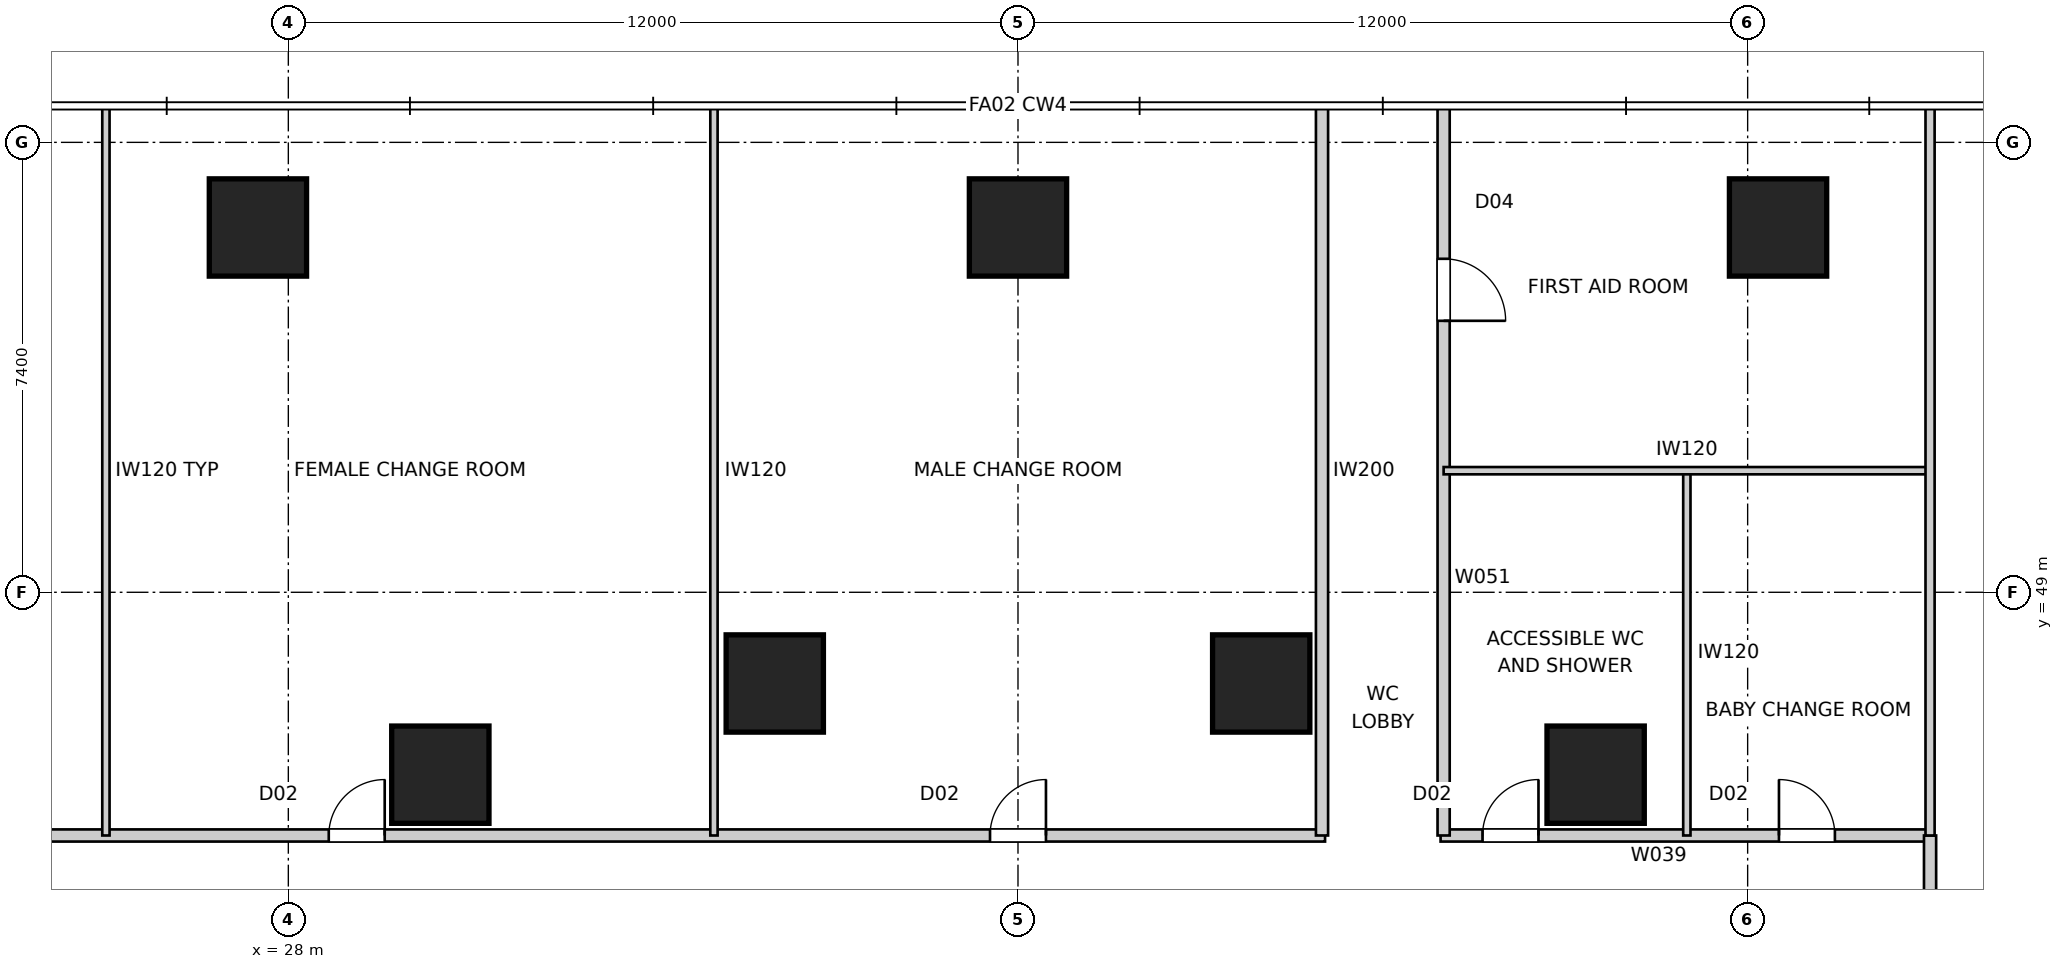
"""IFC4 building model, lengths in metres.
Left out: names, types, materials, properties, quantities, classifications, styles, units other than length and angle.
Written with IfcOpenShell. Run it as: python <this file> out.ifc"""

import sys

from ifc_helpers import new_model, si_unit, direction, frame, frame_2d, origin, origin_2d, place, context, subcontext, project, spatial, rectangle, extrude, element, fill, save


model = new_model("IFC4")
c1 = context("Model", 3, precision=1e-05, world=origin(), true_north=direction((0.0, 1.0)))
c2 = subcontext(c1, "Body", "Model", "MODEL_VIEW")
j1 = project(units=[si_unit("LENGTHUNIT", "METRE"), si_unit("PLANEANGLEUNIT", "RADIAN")], contexts=[c1])
p1 = place(None, origin())
s1 = spatial("IfcSite", under=j1, at=p1, CompositionType="ELEMENT")
p2 = place(p1, origin())
s2 = spatial("IfcBuilding", under=s1, at=p2, CompositionType="ELEMENT")
p3 = place(p2, frame((0.0, 0.0, 6.0)))
s3 = spatial("IfcBuildingStorey", under=s2, at=p3, CompositionType="ELEMENT", Elevation=6.0)
for number, where, z_axis, x_axis in (
    (1, (52.5, 55.0, 0.0), (0.0, 0.0, 1.0), (1.0, 0.0, 0.0)),
    (2, (40.0, 55.0, 0.0), (0.0, 0.0, 1.0), (1.0, 0.0, 0.0)),
    (3, (27.5, 55.0, 0.0), (0.0, 0.0, 1.0), (1.0, 0.0, 0.0)),
    (4, (49.5, 46.0, 0.0), (0.0, 0.0, 1.0), (1.0, 0.0, 0.0)),
    (5, (44.0, 47.5, 0.0), (0.0, 0.0, 1.0), (1.0, 0.0, 0.0)),
    (6, (36.0, 47.5, 0.0), (0.0, 0.0, 1.0), (1.0, 0.0, 0.0)),
    (7, (30.5, 46.0, 0.0), (0.0, 0.0, 1.0), (1.0, 0.0, 0.0)),
):
    element("IfcColumn", number, at=place(p3, frame(where, z_axis=z_axis, x_axis=x_axis)), inside=s3, PredefinedType="COLUMN", context=c2, shape_type="SweptSolid", body=[
        extrude(rectangle(XDim=1.6, YDim=1.6, at=origin_2d()), origin(), (0.0, 0.0, 1.0), 4.5),
    ])
p4 = place(p3, frame((8.4, 45.0, 0.0), z_axis=(0.0, 0.0, 1.0), x_axis=(1.0, 0.0, 0.0)))
e8 = element("IfcWall", 8, at=p4, inside=s3, PredefinedType="PARTITIONING", context=c2, shape_type="SweptSolid", body=[
    extrude(rectangle(XDim=36.65, YDim=0.2, at=frame_2d((18.325, 0.0))), origin(), (0.0, 0.0, 1.0), 4.15),
])
p5 = place(p4, frame((31.14, 0.0, 0.0)))
e9 = element("IfcOpeningElement", 9, at=p5, cuts=e8, PredefinedType="OPENING", context=c2, shape_type="SweptSolid", body=[
    extrude(rectangle(XDim=0.92, YDim=2.34, at=frame_2d((0.46, 1.17))), frame((0.0, 0.11, 0.0), z_axis=(0.0, -1.0, 0.0), x_axis=(1.0, 0.0, 0.0)), (0.0, 0.0, 1.0), 0.22),
])
p6 = place(p4, frame((20.265, 0.0, 0.0)))
e10 = element("IfcOpeningElement", 10, at=p6, cuts=e8, PredefinedType="OPENING", context=c2, shape_type="SweptSolid", body=[
    extrude(rectangle(XDim=0.92, YDim=2.34, at=frame_2d((0.46, 1.17))), frame((0.0, 0.11, 0.0), z_axis=(0.0, -1.0, 0.0), x_axis=(1.0, 0.0, 0.0)), (0.0, 0.0, 1.0), 0.22),
])
p7 = place(p4, frame((7.715, 0.0, 0.0)))
e11 = element("IfcOpeningElement", 11, at=p7, cuts=e8, PredefinedType="OPENING", context=c2, shape_type="SweptSolid", body=[
    extrude(rectangle(XDim=0.92, YDim=2.34, at=frame_2d((0.46, 1.17))), frame((0.0, 0.11, 0.0), z_axis=(0.0, -1.0, 0.0), x_axis=(1.0, 0.0, 0.0)), (0.0, 0.0, 1.0), 0.22),
])
p8 = place(p3, frame((46.95, 45.0, 0.0), z_axis=(0.0, 0.0, 1.0), x_axis=(1.0, 0.0, 0.0)))
e12 = element("IfcWall", 12, at=p8, inside=s3, PredefinedType="PARTITIONING", context=c2, shape_type="SweptSolid", body=[
    extrude(rectangle(XDim=8.05, YDim=0.2, at=frame_2d((4.025, 0.0))), origin(), (0.0, 0.0, 1.0), 4.15),
])
p9 = place(p8, frame((0.69, 0.0, 0.0)))
e13 = element("IfcOpeningElement", 13, at=p9, cuts=e12, PredefinedType="OPENING", context=c2, shape_type="SweptSolid", body=[
    extrude(rectangle(XDim=0.92, YDim=2.34, at=frame_2d((0.46, 1.17))), frame((0.0, 0.11, 0.0), z_axis=(0.0, -1.0, 0.0), x_axis=(1.0, 0.0, 0.0)), (0.0, 0.0, 1.0), 0.22),
])
p10 = place(p8, frame((5.565, 0.0, 0.0)))
e14 = element("IfcOpeningElement", 14, at=p10, cuts=e12, PredefinedType="OPENING", context=c2, shape_type="SweptSolid", body=[
    extrude(rectangle(XDim=0.92, YDim=2.34, at=frame_2d((0.46, 1.17))), frame((0.0, 0.11, 0.0), z_axis=(0.0, -1.0, 0.0), x_axis=(1.0, 0.0, 0.0)), (0.0, 0.0, 1.0), 0.22),
])
p11 = place(p3, frame((55.0, 45.0, 0.0), z_axis=(0.0, 0.0, 1.0), x_axis=(0.0, -1.0, 0.0)))
e15 = element("IfcWall", 15, at=p11, inside=s3, PredefinedType="PARTITIONING", context=c2, shape_type="SweptSolid", body=[
    extrude(rectangle(XDim=26.05, YDim=0.2, at=frame_2d((13.025, 0.0))), origin(), (0.0, 0.0, 1.0), 4.15),
])
p12 = place(p11, frame((19.04, 0.0, 0.0)))
e16 = element("IfcOpeningElement", 16, at=p12, cuts=e15, PredefinedType="OPENING", context=c2, shape_type="SweptSolid", body=[
    extrude(rectangle(XDim=0.92, YDim=2.34, at=frame_2d((0.46, 1.17))), frame((0.0, 0.11, 0.0), z_axis=(0.0, -1.0, 0.0), x_axis=(1.0, 0.0, 0.0)), (0.0, 0.0, 1.0), 0.22),
])
p13 = place(p11, frame((6.465, 0.0, 0.0)))
e17 = element("IfcOpeningElement", 17, at=p13, cuts=e15, PredefinedType="OPENING", context=c2, shape_type="SweptSolid", body=[
    extrude(rectangle(XDim=1.02, YDim=2.1, at=frame_2d((0.51, 1.05))), frame((0.0, 0.11, 0.0), z_axis=(0.0, -1.0, 0.0), x_axis=(1.0, 0.0, 0.0)), (0.0, 0.0, 1.0), 0.22),
])
for number, where, z_axis, x_axis in (
    (18, (25.0, 57.0, 0.0), (0.0, 0.0, 1.0), (0.0, -1.0, 0.0)),
    (19, (35.0, 57.0, 0.0), (0.0, 0.0, 1.0), (0.0, -1.0, 0.0)),
):
    element("IfcWall", number, at=place(p3, frame(where, z_axis=z_axis, x_axis=x_axis)), inside=s3, PredefinedType="PARTITIONING", context=c2, shape_type="SweptSolid", body=[
        extrude(rectangle(XDim=12.0, YDim=0.12, at=frame_2d((6.0, 0.0))), origin(), (0.0, 0.0, 1.0), 4.15),
    ])
p14 = place(p3, frame((45.0, 57.0, 0.0), z_axis=(0.0, 0.0, 1.0), x_axis=(0.0, -1.0, 0.0)))
e20 = element("IfcWall", 20, at=p14, inside=s3, PredefinedType="PARTITIONING", context=c2, shape_type="SweptSolid", body=[
    extrude(rectangle(XDim=12.0, YDim=0.2, at=frame_2d((6.0, 0.0))), origin(), (0.0, 0.0, 1.0), 4.15),
])
p15 = place(p3, frame((47.0, 57.0, 0.0), z_axis=(0.0, 0.0, 1.0), x_axis=(0.0, -1.0, 0.0)))
e21 = element("IfcWall", 21, at=p15, inside=s3, PredefinedType="PARTITIONING", context=c2, shape_type="SweptSolid", body=[
    extrude(rectangle(XDim=12.0, YDim=0.2, at=frame_2d((6.0, 0.0))), origin(), (0.0, 0.0, 1.0), 4.15),
])
p16 = place(p15, frame((2.515, 0.0, 0.0)))
e22 = element("IfcOpeningElement", 22, at=p16, cuts=e21, PredefinedType="OPENING", context=c2, shape_type="SweptSolid", body=[
    extrude(rectangle(XDim=1.02, YDim=2.4, at=frame_2d((0.51, 1.2))), frame((0.0, 0.11, 0.0), z_axis=(0.0, -1.0, 0.0), x_axis=(1.0, 0.0, 0.0)), (0.0, 0.0, 1.0), 0.22),
])
p17 = place(p3, frame((51.0, 51.0, 0.0), z_axis=(0.0, 0.0, 1.0), x_axis=(0.0, -1.0, 0.0)))
e23 = element("IfcWall", 23, at=p17, inside=s3, PredefinedType="PARTITIONING", context=c2, shape_type="SweptSolid", body=[
    extrude(rectangle(XDim=6.0, YDim=0.12, at=frame_2d((3.0, 0.0))), origin(), (0.0, 0.0, 1.0), 4.15),
])
p18 = place(p3, frame((47.0, 51.0, 0.0), z_axis=(0.0, 0.0, 1.0), x_axis=(1.0, 0.0, 0.0)))
e24 = element("IfcWall", 24, at=p18, inside=s3, PredefinedType="PARTITIONING", context=c2, shape_type="SweptSolid", body=[
    extrude(rectangle(XDim=8.0, YDim=0.12, at=frame_2d((4.0, 0.0))), origin(), (0.0, 0.0, 1.0), 4.15),
])
p19 = place(p3, frame((55.0, 57.0, 0.0), z_axis=(0.0, 0.0, 1.0), x_axis=(0.0, -1.0, 0.0)))
e25 = element("IfcWall", 25, at=p19, inside=s3, PredefinedType="SOLIDWALL", context=c2, shape_type="SweptSolid", body=[
    extrude(rectangle(XDim=12.0, YDim=0.15, at=frame_2d((6.0, 0.0))), origin(), (0.0, 0.0, 1.0), 4.15),
])
p20 = place(p5, origin())
e26 = element("IfcDoor", 26, at=p20, inside=s3, OperationType="SINGLE_SWING_RIGHT", PredefinedType="DOOR", context=c2, shape_type="SweptSolid", body=[
    extrude(rectangle(XDim=0.92, YDim=2.34, at=frame_2d((0.46, 1.17))), frame((0.0, 0.025, 0.0), z_axis=(0.0, -1.0, 0.0), x_axis=(1.0, 0.0, 0.0)), (0.0, 0.0, 1.0), 0.05),
])
fill(e9, e26)
p21 = place(p6, origin())
e27 = element("IfcDoor", 27, at=p21, inside=s3, OperationType="SINGLE_SWING_RIGHT", PredefinedType="DOOR", context=c2, shape_type="SweptSolid", body=[
    extrude(rectangle(XDim=0.92, YDim=2.34, at=frame_2d((0.46, 1.17))), frame((0.0, 0.025, 0.0), z_axis=(0.0, -1.0, 0.0), x_axis=(1.0, 0.0, 0.0)), (0.0, 0.0, 1.0), 0.05),
])
fill(e10, e27)
p22 = place(p9, origin())
e28 = element("IfcDoor", 28, at=p22, inside=s3, OperationType="SINGLE_SWING_RIGHT", PredefinedType="DOOR", context=c2, shape_type="SweptSolid", body=[
    extrude(rectangle(XDim=0.92, YDim=2.34, at=frame_2d((0.46, 1.17))), frame((0.0, 0.025, 0.0), z_axis=(0.0, -1.0, 0.0), x_axis=(1.0, 0.0, 0.0)), (0.0, 0.0, 1.0), 0.05),
])
fill(e13, e28)
p23 = place(p10, origin())
e29 = element("IfcDoor", 29, at=p23, inside=s3, OperationType="SINGLE_SWING_LEFT", PredefinedType="DOOR", context=c2, shape_type="SweptSolid", body=[
    extrude(rectangle(XDim=0.92, YDim=2.34, at=frame_2d((0.46, 1.17))), frame((0.0, 0.025, 0.0), z_axis=(0.0, -1.0, 0.0), x_axis=(1.0, 0.0, 0.0)), (0.0, 0.0, 1.0), 0.05),
])
fill(e14, e29)
p24 = place(p16, origin())
e30 = element("IfcDoor", 30, at=p24, inside=s3, OperationType="SINGLE_SWING_RIGHT", PredefinedType="DOOR", context=c2, shape_type="SweptSolid", body=[
    extrude(rectangle(XDim=1.02, YDim=2.4, at=frame_2d((0.51, 1.2))), frame((0.0, 0.025, 0.0), z_axis=(0.0, -1.0, 0.0), x_axis=(1.0, 0.0, 0.0)), (0.0, 0.0, 1.0), 0.05),
])
fill(e22, e30)
save(model, sys.argv[1])
